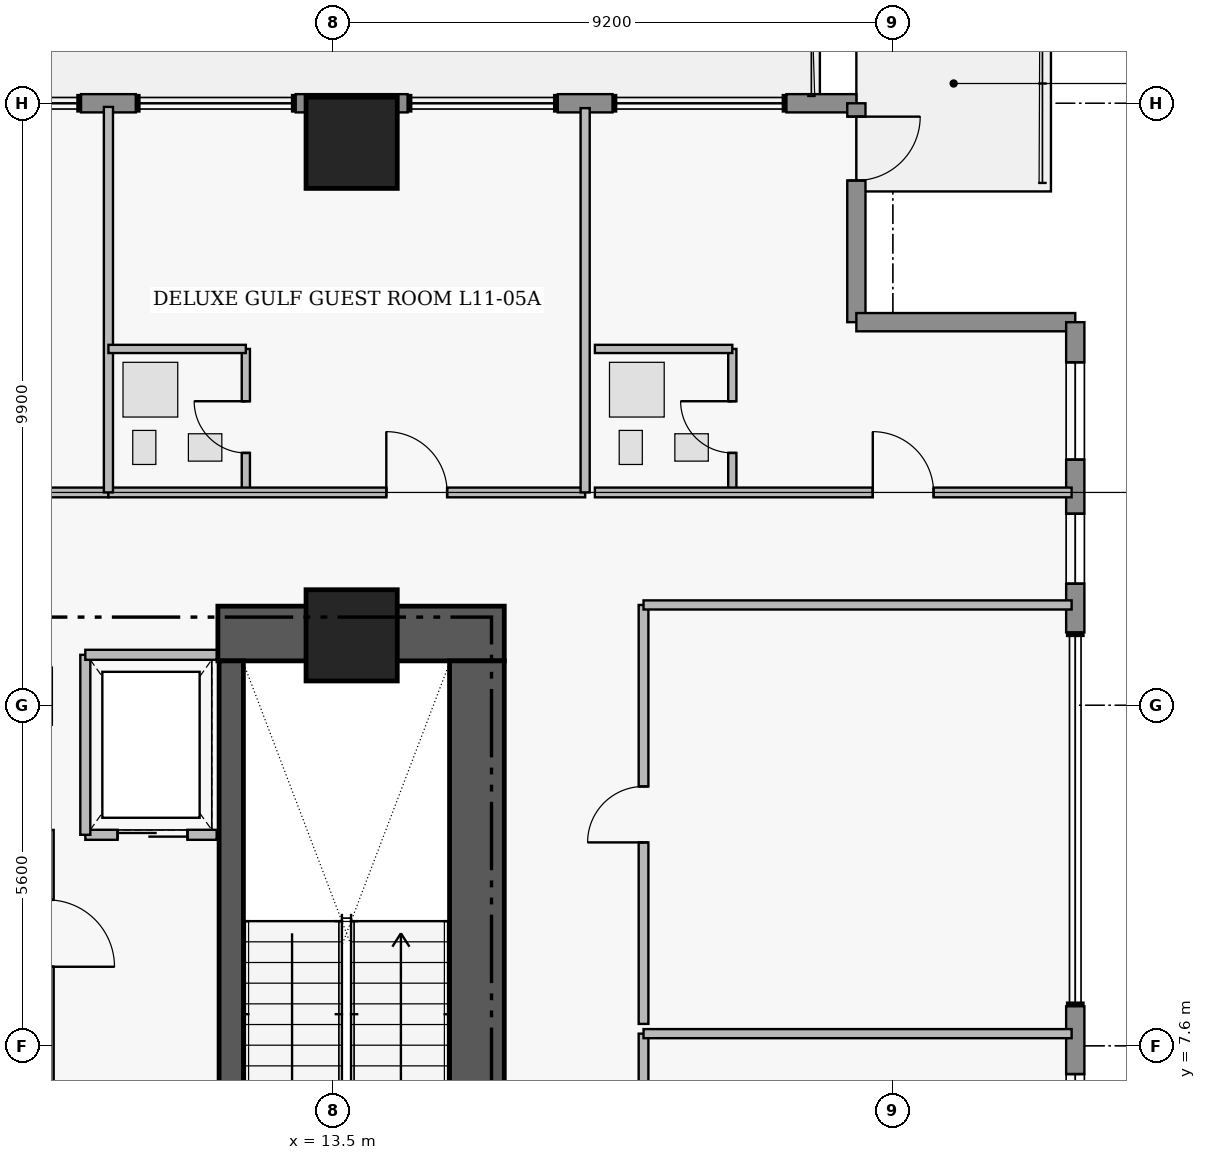
"""IFC4 building model, lengths in metres.
Left out: names, types, materials, properties, quantities, classifications, styles, units other than length and angle.
Written with IfcOpenShell. Run it as: python <this file> out.ifc"""

import sys

from ifc_helpers import new_model, si_unit, direction, frame, frame_2d, origin, origin_2d, place, context, subcontext, project, spatial, rectangle, extrude, element, fill, save


model = new_model("IFC4")
c1 = context("Model", 3, precision=1e-05, world=origin(), true_north=direction((0.0, 1.0)))
c2 = subcontext(c1, "Body", "Model", "MODEL_VIEW")
j1 = project(units=[si_unit("LENGTHUNIT", "METRE"), si_unit("PLANEANGLEUNIT", "RADIAN")], contexts=[c1])
p1 = place(None, origin())
s1 = spatial("IfcSite", under=j1, at=p1, CompositionType="ELEMENT")
p2 = place(p1, origin())
s2 = spatial("IfcBuilding", under=s1, at=p2, CompositionType="ELEMENT")
p3 = place(p2, frame((0.0, 0.0, 49.5)))
s3 = spatial("IfcBuildingStorey", under=s2, at=p3, CompositionType="ELEMENT", Elevation=49.5)
p4 = place(p3, frame((11.6, 14.38, 0.0), z_axis=(0.0, 0.0, 1.0), x_axis=(1.0, 0.0, 0.0)))
e1 = element("IfcWall", 1, at=p4, inside=s3, PredefinedType="SHEAR", context=c2, shape_type="SweptSolid", body=[
    extrude(rectangle(XDim=4.71, YDim=0.9, at=frame_2d((2.355, 0.0))), origin(), (0.0, 0.0, 1.0), 3.46),
])
p5 = place(p3, frame((15.86, 4.97, 0.0), z_axis=(0.0, 0.0, 1.0), x_axis=(0.0, 1.0, 0.0)))
e2 = element("IfcWall", 2, at=p5, inside=s3, PredefinedType="SHEAR", context=c2, shape_type="SweptSolid", body=[
    extrude(rectangle(XDim=8.96, YDim=0.9, at=frame_2d((4.48, 0.0))), origin(), (0.0, 0.0, 1.0), 3.46),
])
p6 = place(p3, frame((11.82, 13.93, 0.0), z_axis=(0.0, 0.0, 1.0), x_axis=(0.0, -1.0, 0.0)))
e3 = element("IfcWall", 3, at=p6, inside=s3, PredefinedType="SHEAR", context=c2, shape_type="SweptSolid", body=[
    extrude(rectangle(XDim=8.96, YDim=0.4, at=frame_2d((4.48, 0.0))), origin(), (0.0, 0.0, 1.0), 3.46),
])
p7 = place(p6, frame((7.53, 0.0, 0.0)))
e4 = element("IfcOpeningElement", 4, at=p7, cuts=e3, PredefinedType="OPENING", context=c2, shape_type="SweptSolid", body=[
    extrude(rectangle(XDim=1.12, YDim=2.22, at=frame_2d((0.56, 1.11))), frame((0.0, 0.21, 0.0), z_axis=(0.0, -1.0, 0.0), x_axis=(1.0, 0.0, 0.0)), (0.0, 0.0, 1.0), 0.42),
])
for number, where, z_axis, x_axis in (
    (5, (13.8, 14.35, 0.0), (0.0, 0.0, 1.0), (1.0, 0.0, 0.0)),
    (6, (13.8, 22.45, 0.0), (0.0, 0.0, 1.0), (1.0, 0.0, 0.0)),
):
    element("IfcColumn", number, at=place(p3, frame(where, z_axis=z_axis, x_axis=x_axis)), inside=s3, PredefinedType="COLUMN", context=c2, shape_type="SweptSolid", body=[
        extrude(rectangle(XDim=1.5, YDim=1.5, at=origin_2d()), origin(), (0.0, 0.0, 1.0), 3.65),
    ])
p8 = place(p3, frame((9.35, 23.1, 0.0), z_axis=(0.0, 0.0, 1.0), x_axis=(1.0, 0.0, 0.0)))
e7 = element("IfcWall", 7, at=p8, inside=s3, PredefinedType="STANDARD", context=c2, shape_type="SweptSolid", body=[
    extrude(rectangle(XDim=0.9, YDim=0.3, at=frame_2d((0.45, 0.0))), origin(), (0.0, 0.0, 1.0), 3.43),
])
p9 = place(p3, frame((12.88, 23.1, 0.0), z_axis=(0.0, 0.0, 1.0), x_axis=(1.0, 0.0, 0.0)))
e8 = element("IfcWall", 8, at=p9, inside=s3, PredefinedType="STANDARD", context=c2, shape_type="SweptSolid", body=[
    extrude(rectangle(XDim=1.84, YDim=0.3, at=frame_2d((0.92, 0.0))), origin(), (0.0, 0.0, 1.0), 3.43),
])
p10 = place(p3, frame((17.19, 23.1, 0.0), z_axis=(0.0, 0.0, 1.0), x_axis=(1.0, 0.0, 0.0)))
e9 = element("IfcWall", 9, at=p10, inside=s3, PredefinedType="STANDARD", context=c2, shape_type="SweptSolid", body=[
    extrude(rectangle(XDim=0.9, YDim=0.3, at=frame_2d((0.45, 0.0))), origin(), (0.0, 0.0, 1.0), 3.43),
])
p11 = place(p3, frame((20.95, 23.1, 0.0), z_axis=(0.0, 0.0, 1.0), x_axis=(1.0, 0.0, 0.0)))
e10 = element("IfcWall", 10, at=p11, inside=s3, PredefinedType="STANDARD", context=c2, shape_type="SweptSolid", body=[
    extrude(rectangle(XDim=1.15, YDim=0.3, at=frame_2d((0.575, 0.0))), origin(), (0.0, 0.0, 1.0), 3.43),
])
p12 = place(p3, frame((22.1, 23.1, 0.0), z_axis=(0.0, 0.0, 1.0), x_axis=(0.0, -1.0, 0.0)))
e11 = element("IfcWall", 11, at=p12, inside=s3, PredefinedType="STANDARD", context=c2, shape_type="SweptSolid", body=[
    extrude(rectangle(XDim=3.6, YDim=0.3, at=frame_2d((1.8, 0.0))), origin(), (0.0, 0.0, 1.0), 3.43),
])
p13 = place(p12, frame((0.22, 0.0, 0.0)))
e12 = element("IfcOpeningElement", 12, at=p13, cuts=e11, PredefinedType="OPENING", context=c2, shape_type="SweptSolid", body=[
    extrude(rectangle(XDim=1.05, YDim=2.2, at=frame_2d((0.525, 1.1))), frame((0.0, 0.16, 0.0), z_axis=(0.0, -1.0, 0.0), x_axis=(1.0, 0.0, 0.0)), (0.0, 0.0, 1.0), 0.32),
])
p14 = place(p3, frame((22.1, 19.5, 0.0), z_axis=(0.0, 0.0, 1.0), x_axis=(1.0, 0.0, 0.0)))
e13 = element("IfcWall", 13, at=p14, inside=s3, PredefinedType="STANDARD", context=c2, shape_type="SweptSolid", body=[
    extrude(rectangle(XDim=3.6, YDim=0.3, at=frame_2d((1.8, 0.0))), origin(), (0.0, 0.0, 1.0), 3.43),
])
p15 = place(p3, frame((25.7, 19.5, 0.0), z_axis=(0.0, 0.0, 1.0), x_axis=(0.0, -1.0, 0.0)))
e14 = element("IfcWall", 14, at=p15, inside=s3, PredefinedType="STANDARD", context=c2, shape_type="SweptSolid", body=[
    extrude(rectangle(XDim=5.1, YDim=0.3, at=frame_2d((2.55, 0.0))), origin(), (0.0, 0.0, 1.0), 3.43),
])
p16 = place(p15, frame((0.66, 0.0, 0.85)))
e15 = element("IfcOpeningElement", 15, at=p16, cuts=e14, PredefinedType="OPENING", context=c2, shape_type="SweptSolid", body=[
    extrude(rectangle(XDim=1.6, YDim=1.8, at=frame_2d((0.8, 0.9))), frame((0.0, 0.16, 0.0), z_axis=(0.0, -1.0, 0.0), x_axis=(1.0, 0.0, 0.0)), (0.0, 0.0, 1.0), 0.32),
])
p17 = place(p15, frame((3.15, 0.0, 0.95)))
e16 = element("IfcOpeningElement", 16, at=p17, cuts=e14, PredefinedType="OPENING", context=c2, shape_type="SweptSolid", body=[
    extrude(rectangle(XDim=1.15, YDim=1.55, at=frame_2d((0.575, 0.775))), frame((0.0, 0.16, 0.0), z_axis=(0.0, -1.0, 0.0), x_axis=(1.0, 0.0, 0.0)), (0.0, 0.0, 1.0), 0.32),
])
p18 = place(p3, frame((25.7, 8.25, 0.0), z_axis=(0.0, 0.0, 1.0), x_axis=(0.0, -1.0, 0.0)))
e17 = element("IfcWall", 17, at=p18, inside=s3, PredefinedType="STANDARD", context=c2, shape_type="SweptSolid", body=[
    extrude(rectangle(XDim=3.05, YDim=0.3, at=frame_2d((1.525, 0.0))), origin(), (0.0, 0.0, 1.0), 3.43),
])
p19 = place(p18, frame((1.115, 0.0, 0.95)))
e18 = element("IfcOpeningElement", 18, at=p19, cuts=e17, PredefinedType="OPENING", context=c2, shape_type="SweptSolid", body=[
    extrude(rectangle(XDim=1.15, YDim=1.55, at=frame_2d((0.575, 0.775))), frame((0.0, 0.16, 0.0), z_axis=(0.0, -1.0, 0.0), x_axis=(1.0, 0.0, 0.0)), (0.0, 0.0, 1.0), 0.32),
])
p20 = place(p3, frame((8.8, 11.15, 0.0), z_axis=(0.0, 0.0, 1.0), x_axis=(0.0, -1.0, 0.0)))
e19 = element("IfcWall", 19, at=p20, inside=s3, PredefinedType="PARTITIONING", context=c2, shape_type="SweptSolid", body=[
    extrude(rectangle(XDim=6.1, YDim=0.2, at=frame_2d((3.05, 0.0))), origin(), (0.0, 0.0, 1.0), 3.43),
])
p21 = place(p20, frame((1.15, 0.0, 0.0)))
e20 = element("IfcOpeningElement", 20, at=p21, cuts=e19, PredefinedType="OPENING", context=c2, shape_type="SweptSolid", body=[
    extrude(rectangle(XDim=1.1, YDim=2.2, at=frame_2d((0.55, 1.1))), frame((0.0, 0.11, 0.0), z_axis=(0.0, -1.0, 0.0), x_axis=(1.0, 0.0, 0.0)), (0.0, 0.0, 1.0), 0.22),
])
p22 = place(p20, frame((4.75, 0.0, 0.0)))
e21 = element("IfcOpeningElement", 21, at=p22, cuts=e19, PredefinedType="OPENING", context=c2, shape_type="SweptSolid", body=[
    extrude(rectangle(XDim=1.1, YDim=2.2, at=frame_2d((0.55, 1.1))), frame((0.0, 0.11, 0.0), z_axis=(0.0, -1.0, 0.0), x_axis=(1.0, 0.0, 0.0)), (0.0, 0.0, 1.0), 0.22),
])
p23 = place(p3, frame((9.42, 11.07, 0.0), z_axis=(0.0, 0.0, 1.0), x_axis=(1.0, 0.0, 0.0)))
e22 = element("IfcWall", 22, at=p23, inside=s3, PredefinedType="PARTITIONING", context=c2, shape_type="SweptSolid", body=[
    extrude(rectangle(XDim=2.16, YDim=0.165, at=frame_2d((1.08, 0.0))), origin(), (0.0, 0.0, 1.0), 3.43),
])
p24 = place(p23, frame((0.53, 0.0, 0.0)))
e23 = element("IfcOpeningElement", 23, at=p24, cuts=e22, PredefinedType="OPENING", context=c2, shape_type="SweptSolid", body=[
    extrude(rectangle(XDim=1.15, YDim=2.25, at=frame_2d((0.575, 1.125))), frame((0.0, 0.093, 0.0), z_axis=(0.0, -1.0, 0.0), x_axis=(1.0, 0.0, 0.0)), (0.0, 0.0, 1.0), 0.185),
])
p25 = place(p3, frame((2.2, 16.7, 0.0), z_axis=(0.0, 0.0, 1.0), x_axis=(1.0, 0.0, 0.0)))
e24 = element("IfcWall", 24, at=p25, inside=s3, PredefinedType="PARTITIONING", context=c2, shape_type="SweptSolid", body=[
    extrude(rectangle(XDim=7.6, YDim=0.16, at=frame_2d((3.8, 0.0))), origin(), (0.0, 0.0, 1.0), 2.973),
])
p26 = place(p25, frame((4.21, 0.0, 0.0)))
e25 = element("IfcOpeningElement", 25, at=p26, cuts=e24, PredefinedType="OPENING", context=c2, shape_type="SweptSolid", body=[
    extrude(rectangle(XDim=1.08, YDim=2.18, at=frame_2d((0.54, 1.09))), frame((0.0, 0.09, 0.0), z_axis=(0.0, -1.0, 0.0), x_axis=(1.0, 0.0, 0.0)), (0.0, 0.0, 1.0), 0.18),
])
p27 = place(p3, frame((12.06, 16.7, 0.0), z_axis=(0.0, 0.0, 1.0), x_axis=(0.0, 1.0, 0.0)))
e26 = element("IfcWall", 26, at=p27, inside=s3, PredefinedType="PLUMBINGWALL", context=c2, shape_type="SweptSolid", body=[
    extrude(rectangle(XDim=2.36, YDim=0.135, at=frame_2d((1.18, 0.0))), origin(), (0.0, 0.0, 1.0), 3.43),
])
p28 = place(p27, frame((0.65, 0.0, 0.0)))
e27 = element("IfcOpeningElement", 27, at=p28, cuts=e26, PredefinedType="OPENING", context=c2, shape_type="SweptSolid", body=[
    extrude(rectangle(XDim=0.85, YDim=2.1, at=frame_2d((0.425, 1.05))), frame((0.0, 0.077, 0.0), z_axis=(0.0, -1.0, 0.0), x_axis=(1.0, 0.0, 0.0)), (0.0, 0.0, 1.0), 0.155),
])
p29 = place(p3, frame((9.8, 16.7, 0.0), z_axis=(0.0, 0.0, 1.0), x_axis=(1.0, 0.0, 0.0)))
e28 = element("IfcWall", 28, at=p29, inside=s3, PredefinedType="PARTITIONING", context=c2, shape_type="SweptSolid", body=[
    extrude(rectangle(XDim=7.84, YDim=0.16, at=frame_2d((3.92, 0.0))), origin(), (0.0, 0.0, 1.0), 2.973),
])
p30 = place(p29, frame((4.57, 0.0, 0.0)))
e29 = element("IfcOpeningElement", 29, at=p30, cuts=e28, PredefinedType="OPENING", context=c2, shape_type="SweptSolid", body=[
    extrude(rectangle(XDim=1.0, YDim=2.15, at=frame_2d((0.5, 1.075))), frame((0.0, 0.09, 0.0), z_axis=(0.0, -1.0, 0.0), x_axis=(1.0, 0.0, 0.0)), (0.0, 0.0, 1.0), 0.18),
])
p31 = place(p3, frame((20.06, 16.7, 0.0), z_axis=(0.0, 0.0, 1.0), x_axis=(0.0, 1.0, 0.0)))
e30 = element("IfcWall", 30, at=p31, inside=s3, PredefinedType="PLUMBINGWALL", context=c2, shape_type="SweptSolid", body=[
    extrude(rectangle(XDim=2.36, YDim=0.135, at=frame_2d((1.18, 0.0))), origin(), (0.0, 0.0, 1.0), 3.43),
])
p32 = place(p31, frame((0.65, 0.0, 0.0)))
e31 = element("IfcOpeningElement", 31, at=p32, cuts=e30, PredefinedType="OPENING", context=c2, shape_type="SweptSolid", body=[
    extrude(rectangle(XDim=0.85, YDim=2.1, at=frame_2d((0.425, 1.05))), frame((0.0, 0.077, 0.0), z_axis=(0.0, -1.0, 0.0), x_axis=(1.0, 0.0, 0.0)), (0.0, 0.0, 1.0), 0.155),
])
p33 = place(p3, frame((17.8, 16.7, 0.0), z_axis=(0.0, 0.0, 1.0), x_axis=(1.0, 0.0, 0.0)))
e32 = element("IfcWall", 32, at=p33, inside=s3, PredefinedType="PARTITIONING", context=c2, shape_type="SweptSolid", body=[
    extrude(rectangle(XDim=7.84, YDim=0.16, at=frame_2d((3.92, 0.0))), origin(), (0.0, 0.0, 1.0), 3.43),
])
p34 = place(p33, frame((4.57, 0.0, 0.0)))
e33 = element("IfcOpeningElement", 33, at=p34, cuts=e32, PredefinedType="OPENING", context=c2, shape_type="SweptSolid", body=[
    extrude(rectangle(XDim=1.0, YDim=2.15, at=frame_2d((0.5, 1.075))), frame((0.0, 0.09, 0.0), z_axis=(0.0, -1.0, 0.0), x_axis=(1.0, 0.0, 0.0)), (0.0, 0.0, 1.0), 0.18),
])
p35 = place(p3, frame((18.6, 1.55, 0.0), z_axis=(0.0, 0.0, 1.0), x_axis=(0.0, 1.0, 0.0)))
e34 = element("IfcWall", 34, at=p35, inside=s3, PredefinedType="PARTITIONING", context=c2, shape_type="SweptSolid", body=[
    extrude(rectangle(XDim=6.25, YDim=0.16, at=frame_2d((3.125, 0.0))), origin(), (0.0, 0.0, 1.0), 3.43),
])
p36 = place(p35, frame((2.665, 0.0, 0.0)))
e35 = element("IfcOpeningElement", 35, at=p36, cuts=e34, PredefinedType="OPENING", context=c2, shape_type="SweptSolid", body=[
    extrude(rectangle(XDim=0.92, YDim=2.12, at=frame_2d((0.46, 1.06))), frame((0.0, 0.09, 0.0), z_axis=(0.0, -1.0, 0.0), x_axis=(1.0, 0.0, 0.0)), (0.0, 0.0, 1.0), 0.18),
])
p37 = place(p3, frame((18.6, 7.96, 0.0), z_axis=(0.0, 0.0, 1.0), x_axis=(0.0, 1.0, 0.0)))
e36 = element("IfcWall", 36, at=p37, inside=s3, PredefinedType="PARTITIONING", context=c2, shape_type="SweptSolid", body=[
    extrude(rectangle(XDim=6.89, YDim=0.16, at=frame_2d((3.445, 0.0))), origin(), (0.0, 0.0, 1.0), 3.43),
])
p38 = place(p37, frame((2.985, 0.0, 0.0)))
e37 = element("IfcOpeningElement", 37, at=p38, cuts=e36, PredefinedType="OPENING", context=c2, shape_type="SweptSolid", body=[
    extrude(rectangle(XDim=0.92, YDim=2.12, at=frame_2d((0.46, 1.06))), frame((0.0, 0.09, 0.0), z_axis=(0.0, -1.0, 0.0), x_axis=(1.0, 0.0, 0.0)), (0.0, 0.0, 1.0), 0.18),
])
p39 = place(p3, frame((9.42, 11.07, 0.0), z_axis=(0.0, 0.0, 1.0), x_axis=(0.0, 1.0, 0.0)))
e38 = element("IfcWall", 38, at=p39, inside=s3, PredefinedType="PARTITIONING", context=c2, shape_type="SweptSolid", body=[
    extrude(rectangle(XDim=2.96, YDim=0.165, at=frame_2d((1.48, 0.0))), origin(), (0.0, 0.0, 1.0), 3.43),
])
p40 = place(p3, frame((9.42, 14.03, 0.0), z_axis=(0.0, 0.0, 1.0), x_axis=(1.0, 0.0, 0.0)))
e39 = element("IfcWall", 39, at=p40, inside=s3, PredefinedType="PARTITIONING", context=c2, shape_type="SweptSolid", body=[
    extrude(rectangle(XDim=2.16, YDim=0.165, at=frame_2d((1.08, 0.0))), origin(), (0.0, 0.0, 1.0), 3.43),
])
p41 = place(p3, frame((9.8, 16.7, 0.0), z_axis=(0.0, 0.0, 1.0), x_axis=(0.0, 1.0, 0.0)))
e40 = element("IfcWall", 40, at=p41, inside=s3, PredefinedType="PARTITIONING", context=c2, shape_type="SweptSolid", body=[
    extrude(rectangle(XDim=6.34, YDim=0.15, at=frame_2d((3.17, 0.0))), origin(), (0.0, 0.0, 1.0), 3.43),
])
p42 = place(p3, frame((9.8, 19.06, 0.0), z_axis=(0.0, 0.0, 1.0), x_axis=(1.0, 0.0, 0.0)))
e41 = element("IfcWall", 41, at=p42, inside=s3, PredefinedType="PLUMBINGWALL", context=c2, shape_type="SweptSolid", body=[
    extrude(rectangle(XDim=2.26, YDim=0.135, at=frame_2d((1.13, 0.0))), origin(), (0.0, 0.0, 1.0), 2.973),
])
p43 = place(p3, frame((17.64, 16.7, 0.0), z_axis=(0.0, 0.0, 1.0), x_axis=(0.0, 1.0, 0.0)))
e42 = element("IfcWall", 42, at=p43, inside=s3, PredefinedType="PARTITIONING", context=c2, shape_type="SweptSolid", body=[
    extrude(rectangle(XDim=6.32, YDim=0.15, at=frame_2d((3.16, 0.0))), origin(), (0.0, 0.0, 1.0), 3.43),
])
p44 = place(p3, frame((17.8, 19.06, 0.0), z_axis=(0.0, 0.0, 1.0), x_axis=(1.0, 0.0, 0.0)))
e43 = element("IfcWall", 43, at=p44, inside=s3, PredefinedType="PLUMBINGWALL", context=c2, shape_type="SweptSolid", body=[
    extrude(rectangle(XDim=2.26, YDim=0.135, at=frame_2d((1.13, 0.0))), origin(), (0.0, 0.0, 1.0), 3.43),
])
for number, where, z_axis, x_axis in (
    (44, (18.6, 7.8, 0.0), (0.0, 0.0, 1.0), (1.0, 0.0, 0.0)),
    (45, (18.6, 14.85, 0.0), (0.0, 0.0, 1.0), (1.0, 0.0, 0.0)),
):
    element("IfcWall", number, at=place(p3, frame(where, z_axis=z_axis, x_axis=x_axis)), inside=s3, PredefinedType="PARTITIONING", context=c2, shape_type="SweptSolid", body=[
        extrude(rectangle(XDim=7.04, YDim=0.15, at=frame_2d((3.52, 0.0))), origin(), (0.0, 0.0, 1.0), 3.43),
    ])
p45 = place(p13, origin())
e46 = element("IfcDoor", 46, at=p45, inside=s3, OperationType="SINGLE_SWING_LEFT", PredefinedType="DOOR", context=c2, shape_type="SweptSolid", body=[
    extrude(rectangle(XDim=1.05, YDim=2.2, at=frame_2d((0.525, 1.1))), frame((0.0, 0.025, 0.0), z_axis=(0.0, -1.0, 0.0), x_axis=(1.0, 0.0, 0.0)), (0.0, 0.0, 1.0), 0.05),
])
fill(e12, e46)
p46 = place(p16, origin())
e47 = element("IfcWindow", 47, at=p46, inside=s3, PartitioningType="SINGLE_PANEL", PredefinedType="WINDOW", context=c2, shape_type="SweptSolid", body=[
    extrude(rectangle(XDim=1.6, YDim=1.8, at=frame_2d((0.8, 0.9))), frame((0.0, 0.03, 0.0), z_axis=(0.0, -1.0, 0.0), x_axis=(1.0, 0.0, 0.0)), (0.0, 0.0, 1.0), 0.06),
])
fill(e15, e47)
p47 = place(p17, origin())
e48 = element("IfcWindow", 48, at=p47, inside=s3, PartitioningType="SINGLE_PANEL", PredefinedType="WINDOW", context=c2, shape_type="SweptSolid", body=[
    extrude(rectangle(XDim=1.15, YDim=1.55, at=frame_2d((0.575, 0.775))), frame((0.0, 0.03, 0.0), z_axis=(0.0, -1.0, 0.0), x_axis=(1.0, 0.0, 0.0)), (0.0, 0.0, 1.0), 0.06),
])
fill(e16, e48)
p48 = place(p19, origin())
e49 = element("IfcWindow", 49, at=p48, inside=s3, PartitioningType="SINGLE_PANEL", PredefinedType="WINDOW", context=c2, shape_type="SweptSolid", body=[
    extrude(rectangle(XDim=1.15, YDim=1.55, at=frame_2d((0.575, 0.775))), frame((0.0, 0.03, 0.0), z_axis=(0.0, -1.0, 0.0), x_axis=(1.0, 0.0, 0.0)), (0.0, 0.0, 1.0), 0.06),
])
fill(e18, e49)
p49 = place(p24, origin())
e50 = element("IfcDoor", 50, at=p49, inside=s3, OperationType="SLIDING_TO_LEFT", PredefinedType="DOOR", context=c2, shape_type="SweptSolid", body=[
    extrude(rectangle(XDim=1.15, YDim=2.25, at=frame_2d((0.575, 1.125))), frame((0.0, 0.025, 0.0), z_axis=(0.0, -1.0, 0.0), x_axis=(1.0, 0.0, 0.0)), (0.0, 0.0, 1.0), 0.05),
])
fill(e23, e50)
p50 = place(p28, origin())
e51 = element("IfcDoor", 51, at=p50, inside=s3, OperationType="SINGLE_SWING_RIGHT", PredefinedType="DOOR", context=c2, shape_type="SweptSolid", body=[
    extrude(rectangle(XDim=0.85, YDim=2.1, at=frame_2d((0.425, 1.05))), frame((0.0, 0.025, 0.0), z_axis=(0.0, -1.0, 0.0), x_axis=(1.0, 0.0, 0.0)), (0.0, 0.0, 1.0), 0.05),
])
fill(e27, e51)
p51 = place(p30, origin())
e52 = element("IfcDoor", 52, at=p51, inside=s3, OperationType="SINGLE_SWING_LEFT", PredefinedType="DOOR", context=c2, shape_type="SweptSolid", body=[
    extrude(rectangle(XDim=1.0, YDim=2.15, at=frame_2d((0.5, 1.075))), frame((0.0, 0.025, 0.0), z_axis=(0.0, -1.0, 0.0), x_axis=(1.0, 0.0, 0.0)), (0.0, 0.0, 1.0), 0.05),
])
fill(e29, e52)
p52 = place(p32, origin())
e53 = element("IfcDoor", 53, at=p52, inside=s3, OperationType="SINGLE_SWING_RIGHT", PredefinedType="DOOR", context=c2, shape_type="SweptSolid", body=[
    extrude(rectangle(XDim=0.85, YDim=2.1, at=frame_2d((0.425, 1.05))), frame((0.0, 0.025, 0.0), z_axis=(0.0, -1.0, 0.0), x_axis=(1.0, 0.0, 0.0)), (0.0, 0.0, 1.0), 0.05),
])
fill(e31, e53)
p53 = place(p34, origin())
e54 = element("IfcDoor", 54, at=p53, inside=s3, OperationType="SINGLE_SWING_LEFT", PredefinedType="DOOR", context=c2, shape_type="SweptSolid", body=[
    extrude(rectangle(XDim=1.0, YDim=2.15, at=frame_2d((0.5, 1.075))), frame((0.0, 0.025, 0.0), z_axis=(0.0, -1.0, 0.0), x_axis=(1.0, 0.0, 0.0)), (0.0, 0.0, 1.0), 0.05),
])
fill(e33, e54)
p54 = place(p38, origin())
e55 = element("IfcDoor", 55, at=p54, inside=s3, OperationType="SINGLE_SWING_LEFT", PredefinedType="DOOR", context=c2, shape_type="SweptSolid", body=[
    extrude(rectangle(XDim=0.92, YDim=2.12, at=frame_2d((0.46, 1.06))), frame((0.0, 0.025, 0.0), z_axis=(0.0, -1.0, 0.0), x_axis=(1.0, 0.0, 0.0)), (0.0, 0.0, 1.0), 0.05),
])
fill(e37, e55)
save(model, sys.argv[1])
